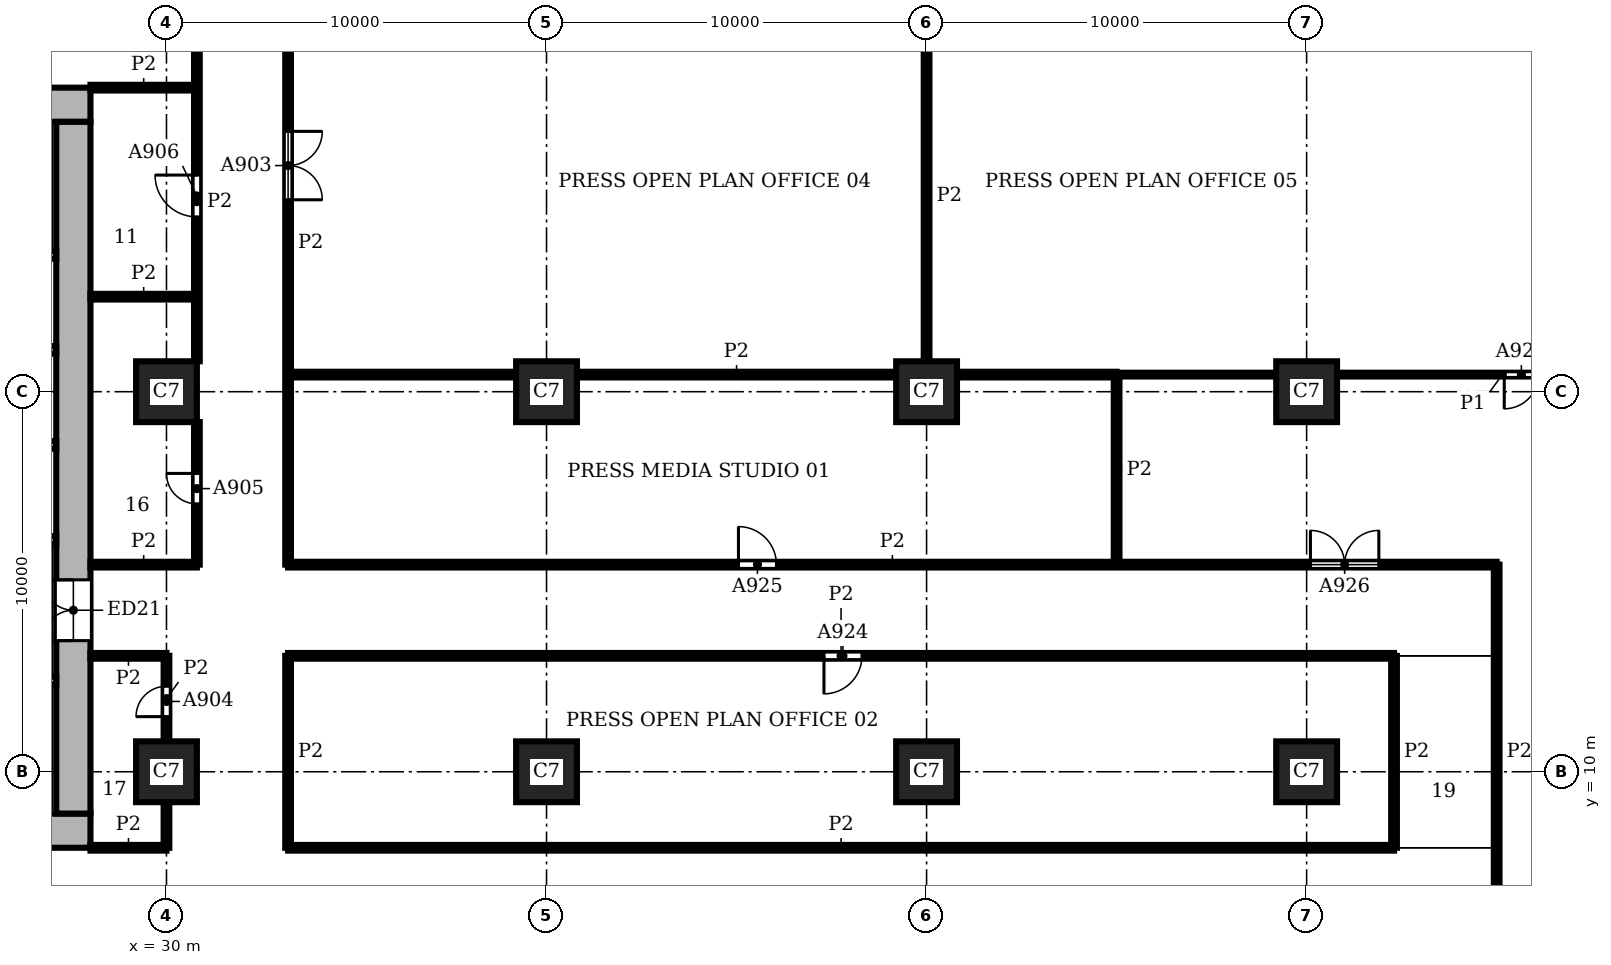
"""IFC4 building model, lengths in metres.
Left out: names, types, materials, properties, quantities, classifications, styles, units other than length and angle.
Written with IfcOpenShell. Run it as: python <this file> out.ifc"""

import sys

from ifc_helpers import new_model, si_unit, direction, frame, frame_2d, origin, origin_2d, place, context, subcontext, project, spatial, rectangle, extrude, element, fill, save


model = new_model("IFC4")
c1 = context("Model", 3, precision=1e-05, world=origin(), true_north=direction((0.0, 1.0)))
c2 = subcontext(c1, "Body", "Model", "MODEL_VIEW")
j1 = project(units=[si_unit("LENGTHUNIT", "METRE"), si_unit("PLANEANGLEUNIT", "RADIAN")], contexts=[c1])
p1 = place(None, origin())
s1 = spatial("IfcSite", under=j1, at=p1, CompositionType="ELEMENT")
p2 = place(p1, origin())
s2 = spatial("IfcBuilding", under=s1, at=p2, CompositionType="ELEMENT")
p3 = place(p2, frame((0.0, 0.0, 105.6)))
s3 = spatial("IfcBuildingStorey", under=s2, at=p3, CompositionType="ELEMENT", Elevation=105.6)
for number, where, z_axis, x_axis in (
    (1, (30.0, 10.0, 0.0), (0.0, 0.0, 1.0), (1.0, 0.0, 0.0)),
    (2, (30.0, 20.0, 0.0), (0.0, 0.0, 1.0), (1.0, 0.0, 0.0)),
    (3, (40.0, 10.0, 0.0), (0.0, 0.0, 1.0), (1.0, 0.0, 0.0)),
    (4, (40.0, 20.0, 0.0), (0.0, 0.0, 1.0), (1.0, 0.0, 0.0)),
    (5, (50.0, 10.0, 0.0), (0.0, 0.0, 1.0), (1.0, 0.0, 0.0)),
    (6, (50.0, 20.0, 0.0), (0.0, 0.0, 1.0), (1.0, 0.0, 0.0)),
    (7, (60.0, 10.0, 0.0), (0.0, 0.0, 1.0), (1.0, 0.0, 0.0)),
    (8, (60.0, 20.0, 0.0), (0.0, 0.0, 1.0), (1.0, 0.0, 0.0)),
):
    element("IfcColumn", number, at=place(p3, frame(where, z_axis=z_axis, x_axis=x_axis)), inside=s3, PredefinedType="COLUMN", context=c2, shape_type="SweptSolid", body=[
        extrude(rectangle(XDim=1.6, YDim=1.6, at=origin_2d()), origin(), (0.0, 0.0, 1.0), 3.9),
    ])
p4 = place(p3, frame((8.0, 8.45, 0.0), z_axis=(0.0, 0.0, 1.0), x_axis=(1.0, 0.0, 0.0)))
e9 = element("IfcWall", 9, at=p4, inside=s3, PredefinedType="SHEAR", context=c2, shape_type="SweptSolid", body=[
    extrude(rectangle(XDim=20.0, YDim=0.9, at=frame_2d((10.0, 0.0))), origin(), (0.0, 0.0, 1.0), 3.9),
])
p5 = place(p3, frame((27.55, 8.9, 0.0), z_axis=(0.0, 0.0, 1.0), x_axis=(0.0, 1.0, 0.0)))
e10 = element("IfcWall", 10, at=p5, inside=s3, PredefinedType="SHEAR", context=c2, shape_type="SweptSolid", body=[
    extrude(rectangle(XDim=18.2, YDim=0.9, at=frame_2d((9.1, 0.0))), origin(), (0.0, 0.0, 1.0), 3.9),
])
p6 = place(p5, frame((4.55, 0.0, 0.0)))
e11 = element("IfcOpeningElement", 11, at=p6, cuts=e10, PredefinedType="OPENING", context=c2, shape_type="SweptSolid", body=[
    extrude(rectangle(XDim=1.6, YDim=2.1, at=frame_2d((0.8, 1.05))), frame((0.0, 0.46, 0.0), z_axis=(0.0, -1.0, 0.0), x_axis=(1.0, 0.0, 0.0)), (0.0, 0.0, 1.0), 0.92),
])
p7 = place(p3, frame((28.0, 27.55, 0.0), z_axis=(0.0, 0.0, 1.0), x_axis=(-1.0, 0.0, 0.0)))
e12 = element("IfcWall", 12, at=p7, inside=s3, PredefinedType="SHEAR", context=c2, shape_type="SweptSolid", body=[
    extrude(rectangle(XDim=20.0, YDim=0.9, at=frame_2d((10.0, 0.0))), origin(), (0.0, 0.0, 1.0), 3.9),
])
p8 = place(p3, frame((13.8, 12.4, 0.0), z_axis=(0.0, 0.0, 1.0), x_axis=(1.0, 0.0, 0.0)))
e13 = element("IfcWall", 13, at=p8, inside=s3, PredefinedType="SHEAR", context=c2, shape_type="SweptSolid", body=[
    extrude(rectangle(XDim=13.3, YDim=0.2, at=frame_2d((6.65, 0.0))), origin(), (0.0, 0.0, 1.0), 3.58),
])
p9 = place(p8, frame((2.4, 0.0, 0.0)))
e14 = element("IfcOpeningElement", 14, at=p9, cuts=e13, PredefinedType="OPENING", context=c2, shape_type="SweptSolid", body=[
    extrude(rectangle(XDim=1.1, YDim=2.1, at=frame_2d((0.55, 1.05))), frame((0.0, 0.11, 0.0), z_axis=(0.0, -1.0, 0.0), x_axis=(1.0, 0.0, 0.0)), (0.0, 0.0, 1.0), 0.22),
])
p10 = place(p8, frame((4.9, 0.0, 0.0)))
e15 = element("IfcOpeningElement", 15, at=p10, cuts=e13, PredefinedType="OPENING", context=c2, shape_type="SweptSolid", body=[
    extrude(rectangle(XDim=1.1, YDim=2.1, at=frame_2d((0.55, 1.05))), frame((0.0, 0.11, 0.0), z_axis=(0.0, -1.0, 0.0), x_axis=(1.0, 0.0, 0.0)), (0.0, 0.0, 1.0), 0.22),
])
p11 = place(p8, frame((0.25, 0.0, 0.0)))
e16 = element("IfcOpeningElement", 16, at=p11, cuts=e13, PredefinedType="OPENING", context=c2, shape_type="SweptSolid", body=[
    extrude(rectangle(XDim=1.0, YDim=2.1, at=frame_2d((0.5, 1.05))), frame((0.0, 0.11, 0.0), z_axis=(0.0, -1.0, 0.0), x_axis=(1.0, 0.0, 0.0)), (0.0, 0.0, 1.0), 0.22),
])
for number, where, z_axis, x_axis in (
    (17, (24.3, 16.1, 0.0), (0.0, 0.0, 1.0), (1.0, 0.0, 0.0)),
    (18, (24.3, 18.6, 0.0), (0.0, 0.0, 1.0), (1.0, 0.0, 0.0)),
    (19, (24.3, 21.1, 0.0), (0.0, 0.0, 1.0), (1.0, 0.0, 0.0)),
):
    element("IfcWall", number, at=place(p3, frame(where, z_axis=z_axis, x_axis=x_axis)), inside=s3, PredefinedType="SHEAR", context=c2, shape_type="SweptSolid", body=[
        extrude(rectangle(XDim=2.8, YDim=0.2, at=frame_2d((1.4, 0.0))), origin(), (0.0, 0.0, 1.0), 3.58),
    ])
p12 = place(p3, frame((13.8, 23.6, 0.0), z_axis=(0.0, 0.0, 1.0), x_axis=(1.0, 0.0, 0.0)))
e20 = element("IfcWall", 20, at=p12, inside=s3, PredefinedType="SHEAR", context=c2, shape_type="SweptSolid", body=[
    extrude(rectangle(XDim=13.3, YDim=0.2, at=frame_2d((6.65, 0.0))), origin(), (0.0, 0.0, 1.0), 3.58),
])
p13 = place(p12, frame((2.4, 0.0, 0.0)))
e21 = element("IfcOpeningElement", 21, at=p13, cuts=e20, PredefinedType="OPENING", context=c2, shape_type="SweptSolid", body=[
    extrude(rectangle(XDim=1.1, YDim=2.1, at=frame_2d((0.55, 1.05))), frame((0.0, 0.11, 0.0), z_axis=(0.0, -1.0, 0.0), x_axis=(1.0, 0.0, 0.0)), (0.0, 0.0, 1.0), 0.22),
])
p14 = place(p12, frame((4.9, 0.0, 0.0)))
e22 = element("IfcOpeningElement", 22, at=p14, cuts=e20, PredefinedType="OPENING", context=c2, shape_type="SweptSolid", body=[
    extrude(rectangle(XDim=1.1, YDim=2.1, at=frame_2d((0.55, 1.05))), frame((0.0, 0.11, 0.0), z_axis=(0.0, -1.0, 0.0), x_axis=(1.0, 0.0, 0.0)), (0.0, 0.0, 1.0), 0.22),
])
p15 = place(p12, frame((0.25, 0.0, 0.0)))
e23 = element("IfcOpeningElement", 23, at=p15, cuts=e20, PredefinedType="OPENING", context=c2, shape_type="SweptSolid", body=[
    extrude(rectangle(XDim=1.0, YDim=2.1, at=frame_2d((0.5, 1.05))), frame((0.0, 0.11, 0.0), z_axis=(0.0, -1.0, 0.0), x_axis=(1.0, 0.0, 0.0)), (0.0, 0.0, 1.0), 0.22),
])
p16 = place(p3, frame((55.0, 20.45, 0.0), z_axis=(0.0, 0.0, 1.0), x_axis=(1.0, 0.0, 0.0)))
e24 = element("IfcWall", 24, at=p16, inside=s3, PredefinedType="PARTITIONING", context=c2, shape_type="SweptSolid", body=[
    extrude(rectangle(XDim=4.2, YDim=0.1, at=frame_2d((2.1, 0.0))), origin(), (0.0, 0.0, 1.0), 3.58),
])
p17 = place(p3, frame((60.8, 20.45, 0.0), z_axis=(0.0, 0.0, 1.0), x_axis=(1.0, 0.0, 0.0)))
e25 = element("IfcWall", 25, at=p17, inside=s3, PredefinedType="PARTITIONING", context=c2, shape_type="SweptSolid", body=[
    extrude(rectangle(XDim=8.7, YDim=0.1, at=frame_2d((4.35, 0.0))), origin(), (0.0, 0.0, 1.0), 3.58),
])
p18 = place(p17, frame((4.4, 0.0, 0.0)))
e26 = element("IfcOpeningElement", 26, at=p18, cuts=e25, PredefinedType="OPENING", context=c2, shape_type="SweptSolid", body=[
    extrude(rectangle(XDim=0.9, YDim=2.1, at=frame_2d((0.45, 1.05))), frame((0.0, 0.06, 0.0), z_axis=(0.0, -1.0, 0.0), x_axis=(1.0, 0.0, 0.0)), (0.0, 0.0, 1.0), 0.12),
])
p19 = place(p3, frame((30.0, 8.0, 0.0), z_axis=(0.0, 0.0, 1.0), x_axis=(0.0, 1.0, 0.0)))
e27 = element("IfcWall", 27, at=p19, inside=s3, PredefinedType="PARTITIONING", context=c2, shape_type="SweptSolid", body=[
    extrude(rectangle(XDim=1.2, YDim=0.15, at=frame_2d((0.6, 0.0))), origin(), (0.0, 0.0, 1.0), 3.58),
])
p20 = place(p3, frame((30.0, 10.8, 0.0), z_axis=(0.0, 0.0, 1.0), x_axis=(0.0, 1.0, 0.0)))
e28 = element("IfcWall", 28, at=p20, inside=s3, PredefinedType="PARTITIONING", context=c2, shape_type="SweptSolid", body=[
    extrude(rectangle(XDim=2.25, YDim=0.15, at=frame_2d((1.125, 0.0))), origin(), (0.0, 0.0, 1.0), 3.58),
])
p21 = place(p20, frame((0.65, 0.0, 0.0)))
e29 = element("IfcOpeningElement", 29, at=p21, cuts=e28, PredefinedType="OPENING", context=c2, shape_type="SweptSolid", body=[
    extrude(rectangle(XDim=0.8, YDim=2.1, at=frame_2d((0.4, 1.05))), frame((0.0, 0.085, 0.0), z_axis=(0.0, -1.0, 0.0), x_axis=(1.0, 0.0, 0.0)), (0.0, 0.0, 1.0), 0.17),
])
p22 = place(p3, frame((30.8, 15.45, 0.0), z_axis=(0.0, 0.0, 1.0), x_axis=(0.0, 1.0, 0.0)))
e30 = element("IfcWall", 30, at=p22, inside=s3, PredefinedType="PARTITIONING", context=c2, shape_type="SweptSolid", body=[
    extrude(rectangle(XDim=3.75, YDim=0.15, at=frame_2d((1.875, 0.0))), origin(), (0.0, 0.0, 1.0), 3.58),
])
p23 = place(p22, frame((1.6, 0.0, 0.0)))
e31 = element("IfcOpeningElement", 31, at=p23, cuts=e30, PredefinedType="OPENING", context=c2, shape_type="SweptSolid", body=[
    extrude(rectangle(XDim=0.8, YDim=2.1, at=frame_2d((0.4, 1.05))), frame((0.0, 0.085, 0.0), z_axis=(0.0, -1.0, 0.0), x_axis=(1.0, 0.0, 0.0)), (0.0, 0.0, 1.0), 0.17),
])
p24 = place(p3, frame((30.8, 20.8, 0.0), z_axis=(0.0, 0.0, 1.0), x_axis=(0.0, 1.0, 0.0)))
e32 = element("IfcWall", 32, at=p24, inside=s3, PredefinedType="PARTITIONING", context=c2, shape_type="SweptSolid", body=[
    extrude(rectangle(XDim=8.4, YDim=0.15, at=frame_2d((4.2, 0.0))), origin(), (0.0, 0.0, 1.0), 3.58),
])
p25 = place(p24, frame((3.8, 0.0, 0.0)))
e33 = element("IfcOpeningElement", 33, at=p25, cuts=e32, PredefinedType="OPENING", context=c2, shape_type="SweptSolid", body=[
    extrude(rectangle(XDim=1.1, YDim=2.1, at=frame_2d((0.55, 1.05))), frame((0.0, 0.085, 0.0), z_axis=(0.0, -1.0, 0.0), x_axis=(1.0, 0.0, 0.0)), (0.0, 0.0, 1.0), 0.17),
])
p26 = place(p3, frame((33.2, 8.0, 0.0), z_axis=(0.0, 0.0, 1.0), x_axis=(0.0, 1.0, 0.0)))
e34 = element("IfcWall", 34, at=p26, inside=s3, PredefinedType="PARTITIONING", context=c2, shape_type="SweptSolid", body=[
    extrude(rectangle(XDim=5.05, YDim=0.15, at=frame_2d((2.525, 0.0))), origin(), (0.0, 0.0, 1.0), 3.58),
])
p27 = place(p3, frame((33.2, 15.45, 0.0), z_axis=(0.0, 0.0, 1.0), x_axis=(0.0, 1.0, 0.0)))
e35 = element("IfcWall", 35, at=p27, inside=s3, PredefinedType="PARTITIONING", context=c2, shape_type="SweptSolid", body=[
    extrude(rectangle(XDim=16.912, YDim=0.15, at=frame_2d((8.456, 0.0))), origin(), (0.0, 0.0, 1.0), 3.58),
])
p28 = place(p27, frame((9.6, 0.0, 0.0)))
e36 = element("IfcOpeningElement", 36, at=p28, cuts=e35, PredefinedType="OPENING", context=c2, shape_type="SweptSolid", body=[
    extrude(rectangle(XDim=1.8, YDim=2.1, at=frame_2d((0.9, 1.05))), frame((0.0, 0.085, 0.0), z_axis=(0.0, -1.0, 0.0), x_axis=(1.0, 0.0, 0.0)), (0.0, 0.0, 1.0), 0.17),
])
p29 = place(p3, frame((50.0, 20.8, 0.0), z_axis=(0.0, 0.0, 1.0), x_axis=(0.0, 1.0, 0.0)))
e37 = element("IfcWall", 37, at=p29, inside=s3, PredefinedType="PARTITIONING", context=c2, shape_type="SweptSolid", body=[
    extrude(rectangle(XDim=8.7, YDim=0.15, at=frame_2d((4.35, 0.0))), origin(), (0.0, 0.0, 1.0), 3.58),
])
p30 = place(p3, frame((55.0, 15.45, 0.0), z_axis=(0.0, 0.0, 1.0), x_axis=(0.0, 1.0, 0.0)))
e38 = element("IfcWall", 38, at=p30, inside=s3, PredefinedType="PARTITIONING", context=c2, shape_type="SweptSolid", body=[
    extrude(rectangle(XDim=5.0, YDim=0.15, at=frame_2d((2.5, 0.0))), origin(), (0.0, 0.0, 1.0), 3.58),
])
p31 = place(p3, frame((62.3, 8.0, 0.0), z_axis=(0.0, 0.0, 1.0), x_axis=(0.0, 1.0, 0.0)))
e39 = element("IfcWall", 39, at=p31, inside=s3, PredefinedType="PARTITIONING", context=c2, shape_type="SweptSolid", body=[
    extrude(rectangle(XDim=5.05, YDim=0.15, at=frame_2d((2.525, 0.0))), origin(), (0.0, 0.0, 1.0), 3.58),
])
p32 = place(p3, frame((65.0, 5.6, 0.0), z_axis=(0.0, 0.0, 1.0), x_axis=(0.0, 1.0, 0.0)))
e40 = element("IfcWall", 40, at=p32, inside=s3, PredefinedType="PARTITIONING", context=c2, shape_type="SweptSolid", body=[
    extrude(rectangle(XDim=9.85, YDim=0.15, at=frame_2d((4.925, 0.0))), origin(), (0.0, 0.0, 1.0), 3.58),
])
p33 = place(p3, frame((28.0, 8.0, 0.0), z_axis=(0.0, 0.0, 1.0), x_axis=(1.0, 0.0, 0.0)))
e41 = element("IfcWall", 41, at=p33, inside=s3, PredefinedType="PARTITIONING", context=c2, shape_type="SweptSolid", body=[
    extrude(rectangle(XDim=2.0, YDim=0.15, at=frame_2d((1.0, 0.0))), origin(), (0.0, 0.0, 1.0), 3.58),
])
p34 = place(p3, frame((33.2, 8.0, 0.0), z_axis=(0.0, 0.0, 1.0), x_axis=(1.0, 0.0, 0.0)))
e42 = element("IfcWall", 42, at=p34, inside=s3, PredefinedType="PARTITIONING", context=c2, shape_type="SweptSolid", body=[
    extrude(rectangle(XDim=29.1, YDim=0.15, at=frame_2d((14.55, 0.0))), origin(), (0.0, 0.0, 1.0), 3.58),
])
p35 = place(p3, frame((28.0, 13.05, 0.0), z_axis=(0.0, 0.0, 1.0), x_axis=(1.0, 0.0, 0.0)))
e43 = element("IfcWall", 43, at=p35, inside=s3, PredefinedType="PARTITIONING", context=c2, shape_type="SweptSolid", body=[
    extrude(rectangle(XDim=2.0, YDim=0.15, at=frame_2d((1.0, 0.0))), origin(), (0.0, 0.0, 1.0), 3.58),
])
p36 = place(p3, frame((33.2, 13.05, 0.0), z_axis=(0.0, 0.0, 1.0), x_axis=(1.0, 0.0, 0.0)))
e44 = element("IfcWall", 44, at=p36, inside=s3, PredefinedType="PARTITIONING", context=c2, shape_type="SweptSolid", body=[
    extrude(rectangle(XDim=29.1, YDim=0.15, at=frame_2d((14.55, 0.0))), origin(), (0.0, 0.0, 1.0), 3.58),
])
p37 = place(p36, frame((14.1, 0.0, 0.0)))
e45 = element("IfcOpeningElement", 45, at=p37, cuts=e44, PredefinedType="OPENING", context=c2, shape_type="SweptSolid", body=[
    extrude(rectangle(XDim=1.0, YDim=2.1, at=frame_2d((0.5, 1.05))), frame((0.0, 0.085, 0.0), z_axis=(0.0, -1.0, 0.0), x_axis=(1.0, 0.0, 0.0)), (0.0, 0.0, 1.0), 0.17),
])
p38 = place(p3, frame((28.0, 15.45, 0.0), z_axis=(0.0, 0.0, 1.0), x_axis=(1.0, 0.0, 0.0)))
e46 = element("IfcWall", 46, at=p38, inside=s3, PredefinedType="PARTITIONING", context=c2, shape_type="SweptSolid", body=[
    extrude(rectangle(XDim=2.8, YDim=0.15, at=frame_2d((1.4, 0.0))), origin(), (0.0, 0.0, 1.0), 3.58),
])
p39 = place(p3, frame((33.2, 15.45, 0.0), z_axis=(0.0, 0.0, 1.0), x_axis=(1.0, 0.0, 0.0)))
e47 = element("IfcWall", 47, at=p39, inside=s3, PredefinedType="PARTITIONING", context=c2, shape_type="SweptSolid", body=[
    extrude(rectangle(XDim=31.8, YDim=0.15, at=frame_2d((15.9, 0.0))), origin(), (0.0, 0.0, 1.0), 3.58),
])
p40 = place(p39, frame((11.85, 0.0, 0.0)))
e48 = element("IfcOpeningElement", 48, at=p40, cuts=e47, PredefinedType="OPENING", context=c2, shape_type="SweptSolid", body=[
    extrude(rectangle(XDim=1.0, YDim=2.1, at=frame_2d((0.5, 1.05))), frame((0.0, 0.085, 0.0), z_axis=(0.0, -1.0, 0.0), x_axis=(1.0, 0.0, 0.0)), (0.0, 0.0, 1.0), 0.17),
])
p41 = place(p39, frame((26.9, 0.0, 0.0)))
e49 = element("IfcOpeningElement", 49, at=p41, cuts=e47, PredefinedType="OPENING", context=c2, shape_type="SweptSolid", body=[
    extrude(rectangle(XDim=1.8, YDim=2.1, at=frame_2d((0.9, 1.05))), frame((0.0, 0.085, 0.0), z_axis=(0.0, -1.0, 0.0), x_axis=(1.0, 0.0, 0.0)), (0.0, 0.0, 1.0), 0.17),
])
p42 = place(p3, frame((33.2, 20.45, 0.0), z_axis=(0.0, 0.0, 1.0), x_axis=(1.0, 0.0, 0.0)))
e50 = element("IfcWall", 50, at=p42, inside=s3, PredefinedType="PARTITIONING", context=c2, shape_type="SweptSolid", body=[
    extrude(rectangle(XDim=6.0, YDim=0.15, at=frame_2d((3.0, 0.0))), origin(), (0.0, 0.0, 1.0), 3.58),
])
p43 = place(p3, frame((40.8, 20.45, 0.0), z_axis=(0.0, 0.0, 1.0), x_axis=(1.0, 0.0, 0.0)))
e51 = element("IfcWall", 51, at=p43, inside=s3, PredefinedType="PARTITIONING", context=c2, shape_type="SweptSolid", body=[
    extrude(rectangle(XDim=8.4, YDim=0.15, at=frame_2d((4.2, 0.0))), origin(), (0.0, 0.0, 1.0), 3.58),
])
p44 = place(p3, frame((50.8, 20.45, 0.0), z_axis=(0.0, 0.0, 1.0), x_axis=(1.0, 0.0, 0.0)))
e52 = element("IfcWall", 52, at=p44, inside=s3, PredefinedType="PARTITIONING", context=c2, shape_type="SweptSolid", body=[
    extrude(rectangle(XDim=4.2, YDim=0.15, at=frame_2d((2.1, 0.0))), origin(), (0.0, 0.0, 1.0), 3.58),
])
for number, where, z_axis, x_axis in (
    (53, (28.0, 22.5, 0.0), (0.0, 0.0, 1.0), (1.0, 0.0, 0.0)),
    (54, (28.0, 28.0, 0.0), (0.0, 0.0, 1.0), (1.0, 0.0, 0.0)),
):
    element("IfcWall", number, at=place(p3, frame(where, z_axis=z_axis, x_axis=x_axis)), inside=s3, PredefinedType="PARTITIONING", context=c2, shape_type="SweptSolid", body=[
        extrude(rectangle(XDim=2.8, YDim=0.15, at=frame_2d((1.4, 0.0))), origin(), (0.0, 0.0, 1.0), 3.58),
    ])
p45 = place(p6, origin())
e55 = element("IfcDoor", 55, at=p45, inside=s3, OperationType="DOUBLE_DOOR_SINGLE_SWING", PredefinedType="DOOR", context=c2, shape_type="SweptSolid", body=[
    extrude(rectangle(XDim=1.6, YDim=2.1, at=frame_2d((0.8, 1.05))), frame((0.0, 0.025, 0.0), z_axis=(0.0, -1.0, 0.0), x_axis=(1.0, 0.0, 0.0)), (0.0, 0.0, 1.0), 0.05),
])
fill(e11, e55)
p46 = place(p28, frame((1.8, 0.0, 0.0), z_axis=(0.0, 0.0, 1.0), x_axis=(-1.0, 0.0, 0.0)))
e56 = element("IfcDoor", 56, at=p46, inside=s3, OperationType="DOUBLE_DOOR_SINGLE_SWING", PredefinedType="DOOR", context=c2, shape_type="SweptSolid", body=[
    extrude(rectangle(XDim=1.8, YDim=2.1, at=frame_2d((0.9, 1.05))), frame((0.0, 0.025, 0.0), z_axis=(0.0, -1.0, 0.0), x_axis=(1.0, 0.0, 0.0)), (0.0, 0.0, 1.0), 0.05),
])
fill(e36, e56)
p47 = place(p21, origin())
e57 = element("IfcDoor", 57, at=p47, inside=s3, OperationType="SINGLE_SWING_LEFT", PredefinedType="DOOR", context=c2, shape_type="SweptSolid", body=[
    extrude(rectangle(XDim=0.8, YDim=2.1, at=frame_2d((0.4, 1.05))), frame((0.0, 0.025, 0.0), z_axis=(0.0, -1.0, 0.0), x_axis=(1.0, 0.0, 0.0)), (0.0, 0.0, 1.0), 0.05),
])
fill(e29, e57)
p48 = place(p23, origin())
e58 = element("IfcDoor", 58, at=p48, inside=s3, OperationType="SINGLE_SWING_RIGHT", PredefinedType="DOOR", context=c2, shape_type="SweptSolid", body=[
    extrude(rectangle(XDim=0.8, YDim=2.1, at=frame_2d((0.4, 1.05))), frame((0.0, 0.025, 0.0), z_axis=(0.0, -1.0, 0.0), x_axis=(1.0, 0.0, 0.0)), (0.0, 0.0, 1.0), 0.05),
])
fill(e31, e58)
p49 = place(p25, origin())
e59 = element("IfcDoor", 59, at=p49, inside=s3, OperationType="SINGLE_SWING_RIGHT", PredefinedType="DOOR", context=c2, shape_type="SweptSolid", body=[
    extrude(rectangle(XDim=1.1, YDim=2.1, at=frame_2d((0.55, 1.05))), frame((0.0, 0.025, 0.0), z_axis=(0.0, -1.0, 0.0), x_axis=(1.0, 0.0, 0.0)), (0.0, 0.0, 1.0), 0.05),
])
fill(e33, e59)
p50 = place(p37, frame((1.0, 0.0, 0.0), z_axis=(0.0, 0.0, 1.0), x_axis=(-1.0, 0.0, 0.0)))
e60 = element("IfcDoor", 60, at=p50, inside=s3, OperationType="SINGLE_SWING_RIGHT", PredefinedType="DOOR", context=c2, shape_type="SweptSolid", body=[
    extrude(rectangle(XDim=1.0, YDim=2.1, at=frame_2d((0.5, 1.05))), frame((0.0, 0.025, 0.0), z_axis=(0.0, -1.0, 0.0), x_axis=(1.0, 0.0, 0.0)), (0.0, 0.0, 1.0), 0.05),
])
fill(e45, e60)
p51 = place(p40, origin())
e61 = element("IfcDoor", 61, at=p51, inside=s3, OperationType="SINGLE_SWING_LEFT", PredefinedType="DOOR", context=c2, shape_type="SweptSolid", body=[
    extrude(rectangle(XDim=1.0, YDim=2.1, at=frame_2d((0.5, 1.05))), frame((0.0, 0.025, 0.0), z_axis=(0.0, -1.0, 0.0), x_axis=(1.0, 0.0, 0.0)), (0.0, 0.0, 1.0), 0.05),
])
fill(e48, e61)
p52 = place(p41, origin())
e62 = element("IfcDoor", 62, at=p52, inside=s3, OperationType="DOUBLE_DOOR_SINGLE_SWING", PredefinedType="DOOR", context=c2, shape_type="SweptSolid", body=[
    extrude(rectangle(XDim=1.8, YDim=2.1, at=frame_2d((0.9, 1.05))), frame((0.0, 0.025, 0.0), z_axis=(0.0, -1.0, 0.0), x_axis=(1.0, 0.0, 0.0)), (0.0, 0.0, 1.0), 0.05),
])
fill(e49, e62)
p53 = place(p18, frame((0.9, 0.0, 0.0), z_axis=(0.0, 0.0, 1.0), x_axis=(-1.0, 0.0, 0.0)))
e63 = element("IfcDoor", 63, at=p53, inside=s3, OperationType="SINGLE_SWING_RIGHT", PredefinedType="DOOR", context=c2, shape_type="SweptSolid", body=[
    extrude(rectangle(XDim=0.9, YDim=2.1, at=frame_2d((0.45, 1.05))), frame((0.0, 0.025, 0.0), z_axis=(0.0, -1.0, 0.0), x_axis=(1.0, 0.0, 0.0)), (0.0, 0.0, 1.0), 0.05),
])
fill(e26, e63)
save(model, sys.argv[1])
